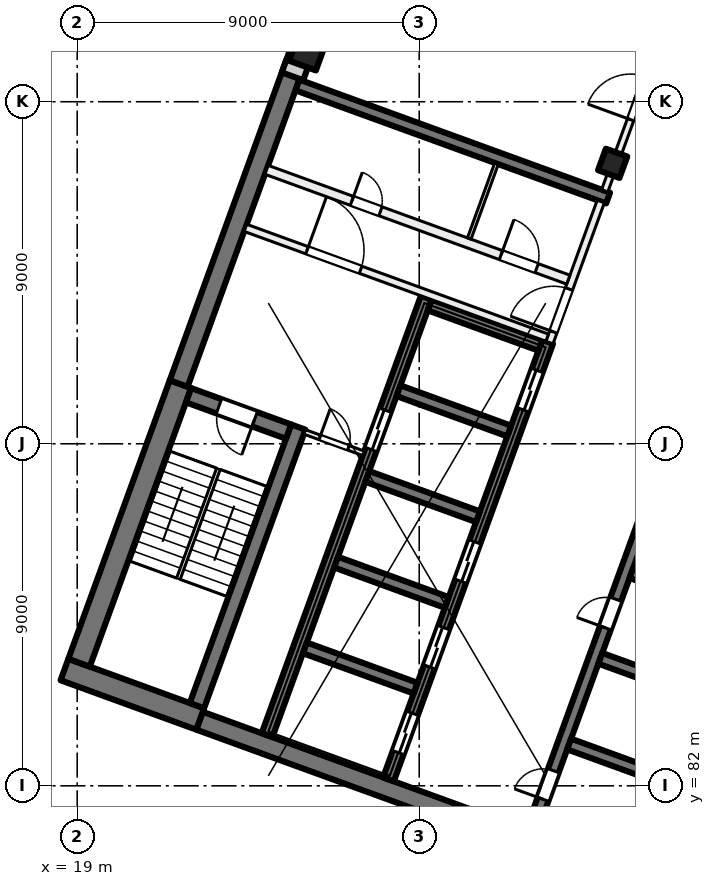
"""IFC4 building model, lengths in metres.
Left out: names, types, materials, properties, quantities, classifications, styles, units other than length and angle.
Written with IfcOpenShell. Run it as: python <this file> out.ifc"""

import sys

from ifc_helpers import new_model, si_unit, direction, frame, frame_2d, origin, origin_2d, place, context, subcontext, project, spatial, rectangle, extrude, element, fill, save


model = new_model("IFC4")
c1 = context("Model", 3, precision=1e-05, world=origin(), true_north=direction((0.0, 1.0)))
c2 = subcontext(c1, "Body", "Model", "MODEL_VIEW")
j1 = project(units=[si_unit("LENGTHUNIT", "METRE"), si_unit("PLANEANGLEUNIT", "RADIAN")], contexts=[c1])
p1 = place(None, origin())
s1 = spatial("IfcSite", under=j1, at=p1, CompositionType="ELEMENT")
p2 = place(p1, origin())
s2 = spatial("IfcBuilding", under=s1, at=p2, CompositionType="ELEMENT")
p3 = place(p2, frame((0.0, 0.0, 192.0)))
s3 = spatial("IfcBuildingStorey", under=s2, at=p3, CompositionType="ELEMENT", Elevation=192.0)
p4 = place(p3, frame((33.091, 98.379, 0.0), z_axis=(0.0, 0.0, 1.0), x_axis=(-0.342020143326, -0.939692620786, 0.0)))
e1 = element("IfcColumn", 1, at=p4, inside=s3, PredefinedType="COLUMN", context=c2, shape_type="SweptSolid", body=[
    extrude(rectangle(XDim=0.6, YDim=0.6, at=origin_2d()), origin(), (0.0, 0.0, 1.0), 4.0),
])
p5 = place(p3, frame((25.056, 101.303, 0.0), z_axis=(0.0, 0.0, 1.0), x_axis=(-0.342020143326, -0.939692620786, 0.0)))
e2 = element("IfcColumn", 2, at=p5, inside=s3, PredefinedType="COLUMN", context=c2, shape_type="SweptSolid", body=[
    extrude(rectangle(XDim=0.75, YDim=0.75, at=origin_2d()), origin(), (0.0, 0.0, 1.0), 4.0),
])
p6 = place(p3, frame((35.75, 78.788, 0.0), z_axis=(0.0, 0.0, 1.0), x_axis=(-0.939692894512, 0.342019391267, 0.0)))
e3 = element("IfcWall", 3, at=p6, inside=s3, PredefinedType="SHEAR", context=c2, shape_type="SweptSolid", body=[
    extrude(rectangle(XDim=14.4, YDim=0.5, at=frame_2d((7.2, 0.0))), origin(), (0.0, 0.0, 1.0), 4.0),
])
p7 = place(p3, frame((22.236, 83.76, 0.0), z_axis=(0.0, 0.0, 1.0), x_axis=(-0.939680822529, 0.342052557032, 0.0)))
e4 = element("IfcWall", 4, at=p7, inside=s3, PredefinedType="SHEAR", context=c2, shape_type="SweptSolid", body=[
    extrude(rectangle(XDim=3.8, YDim=0.6, at=frame_2d((1.9, 0.0))), origin(), (0.0, 0.0, 1.0), 4.0),
])
p8 = place(p3, frame((19.05, 85.239, 0.0), z_axis=(0.0, 0.0, 1.0), x_axis=(0.342016982193, 0.939693771338, 0.0)))
e5 = element("IfcWall", 5, at=p8, inside=s3, PredefinedType="SHEAR", context=c2, shape_type="SweptSolid", body=[
    extrude(rectangle(XDim=7.8, YDim=0.6, at=frame_2d((3.9, 0.0))), origin(), (0.0, 0.0, 1.0), 4.0),
])
p9 = place(p3, frame((21.67, 92.585, 0.0), z_axis=(0.0, 0.0, 1.0), x_axis=(0.342035714298, 0.93968695327, 0.0)))
e6 = element("IfcWall", 6, at=p9, inside=s3, PredefinedType="SHEAR", context=c2, shape_type="SweptSolid", body=[
    extrude(rectangle(XDim=8.975, YDim=0.5, at=frame_2d((4.488, 0.0))), origin(), (0.0, 0.0, 1.0), 4.0),
])
p10 = place(p3, frame((22.15, 84.11, 0.0), z_axis=(0.0, 0.0, 1.0), x_axis=(0.342016982193, 0.939693771338, 0.0)))
e7 = element("IfcWall", 7, at=p10, inside=s3, PredefinedType="SHEAR", context=c2, shape_type="SweptSolid", body=[
    extrude(rectangle(XDim=7.8, YDim=0.4, at=frame_2d((3.9, 0.0))), origin(), (0.0, 0.0, 1.0), 4.0),
])
p11 = place(p3, frame((24.562, 91.32, 0.0), z_axis=(0.0, 0.0, 1.0), x_axis=(-0.939717030584, 0.341953070509, 0.0)))
e8 = element("IfcWall", 8, at=p11, inside=s3, PredefinedType="SHEAR", context=c2, shape_type="SweptSolid", body=[
    extrude(rectangle(XDim=2.8, YDim=0.4, at=frame_2d((1.4, 0.0))), origin(), (0.0, 0.0, 1.0), 4.0),
])
p12 = place(p11, frame((0.95, 0.0, 0.0)))
e9 = element("IfcOpeningElement", 9, at=p12, cuts=e8, PredefinedType="OPENING", context=c2, shape_type="SweptSolid", body=[
    extrude(rectangle(XDim=1.0, YDim=2.1, at=frame_2d((0.5, 1.05))), frame((0.0, 0.21, 0.0), z_axis=(0.0, -1.0, 0.0), x_axis=(1.0, 0.0, 0.0)), (0.0, 0.0, 1.0), 0.42),
])
p13 = place(p3, frame((30.949, 80.801, 0.0), z_axis=(0.0, 0.0, 1.0), x_axis=(0.342016684409, 0.939693879721, 0.0)))
e10 = element("IfcWall", 10, at=p13, inside=s3, PredefinedType="SHEAR", context=c2, shape_type="SweptSolid", body=[
    extrude(rectangle(XDim=12.25, YDim=0.3, at=frame_2d((6.125, 0.0))), origin(), (0.0, 0.0, 1.0), 4.0),
])
p14 = place(p13, frame((0.9, 0.0, 0.0)))
e11 = element("IfcOpeningElement", 11, at=p14, cuts=e10, PredefinedType="OPENING", context=c2, shape_type="SweptSolid", body=[
    extrude(rectangle(XDim=0.8, YDim=2.1, at=frame_2d((0.4, 1.05))), frame((0.0, 0.16, 0.0), z_axis=(0.0, -1.0, 0.0), x_axis=(1.0, 0.0, 0.0)), (0.0, 0.0, 1.0), 0.32),
])
p15 = place(p13, frame((5.7, 0.0, 0.0)))
e12 = element("IfcOpeningElement", 12, at=p15, cuts=e10, PredefinedType="OPENING", context=c2, shape_type="SweptSolid", body=[
    extrude(rectangle(XDim=0.8, YDim=2.1, at=frame_2d((0.4, 1.05))), frame((0.0, 0.16, 0.0), z_axis=(0.0, -1.0, 0.0), x_axis=(1.0, 0.0, 0.0)), (0.0, 0.0, 1.0), 0.32),
])
p16 = place(p3, frame((34.858, 82.039, 0.0), z_axis=(0.0, 0.0, 1.0), x_axis=(-0.939689908313, 0.342027595692, 0.0)))
e13 = element("IfcWall", 13, at=p16, inside=s3, PredefinedType="SHEAR", context=c2, shape_type="SweptSolid", body=[
    extrude(rectangle(XDim=3.1, YDim=0.3, at=frame_2d((1.55, 0.0))), origin(), (0.0, 0.0, 1.0), 4.0),
])
p17 = place(p3, frame((35.679, 84.294, 0.0), z_axis=(0.0, 0.0, 1.0), x_axis=(-0.939706007505, 0.341983361377, 0.0)))
e14 = element("IfcWall", 14, at=p17, inside=s3, PredefinedType="SHEAR", context=c2, shape_type="SweptSolid", body=[
    extrude(rectangle(XDim=3.1, YDim=0.3, at=frame_2d((1.55, 0.0))), origin(), (0.0, 0.0, 1.0), 4.0),
])
p18 = place(p3, frame((36.5, 86.549, 0.0), z_axis=(0.0, 0.0, 1.0), x_axis=(-0.939689908313, 0.342027595692, 0.0)))
e15 = element("IfcWall", 15, at=p18, inside=s3, PredefinedType="SHEAR", context=c2, shape_type="SweptSolid", body=[
    extrude(rectangle(XDim=3.1, YDim=0.3, at=frame_2d((1.55, 0.0))), origin(), (0.0, 0.0, 1.0), 4.0),
])
p19 = place(p3, frame((27.191, 82.169, 0.0), z_axis=(0.0, 0.0, 1.0), x_axis=(0.342016684409, 0.939693879721, 0.0)))
e16 = element("IfcWall", 16, at=p19, inside=s3, PredefinedType="SHEAR", context=c2, shape_type="SweptSolid", body=[
    extrude(rectangle(XDim=12.25, YDim=0.3, at=frame_2d((6.125, 0.0))), origin(), (0.0, 0.0, 1.0), 4.0),
])
p20 = place(p19, frame((0.75, 0.0, 0.0)))
e17 = element("IfcOpeningElement", 17, at=p20, cuts=e16, PredefinedType="OPENING", context=c2, shape_type="SweptSolid", body=[
    extrude(rectangle(XDim=1.1, YDim=2.1, at=frame_2d((0.55, 1.05))), frame((0.0, 0.16, 0.0), z_axis=(0.0, -1.0, 0.0), x_axis=(1.0, 0.0, 0.0)), (0.0, 0.0, 1.0), 0.32),
])
p21 = place(p19, frame((3.15, 0.0, 0.0)))
e18 = element("IfcOpeningElement", 18, at=p21, cuts=e16, PredefinedType="OPENING", context=c2, shape_type="SweptSolid", body=[
    extrude(rectangle(XDim=1.1, YDim=2.1, at=frame_2d((0.55, 1.05))), frame((0.0, 0.16, 0.0), z_axis=(0.0, -1.0, 0.0), x_axis=(1.0, 0.0, 0.0)), (0.0, 0.0, 1.0), 0.32),
])
p22 = place(p19, frame((5.55, 0.0, 0.0)))
e19 = element("IfcOpeningElement", 19, at=p22, cuts=e16, PredefinedType="OPENING", context=c2, shape_type="SweptSolid", body=[
    extrude(rectangle(XDim=1.1, YDim=2.1, at=frame_2d((0.55, 1.05))), frame((0.0, 0.16, 0.0), z_axis=(0.0, -1.0, 0.0), x_axis=(1.0, 0.0, 0.0)), (0.0, 0.0, 1.0), 0.32),
])
p23 = place(p19, frame((10.35, 0.0, 0.0)))
e20 = element("IfcOpeningElement", 20, at=p23, cuts=e16, PredefinedType="OPENING", context=c2, shape_type="SweptSolid", body=[
    extrude(rectangle(XDim=1.1, YDim=2.1, at=frame_2d((0.55, 1.05))), frame((0.0, 0.16, 0.0), z_axis=(0.0, -1.0, 0.0), x_axis=(1.0, 0.0, 0.0)), (0.0, 0.0, 1.0), 0.32),
])
p24 = place(p3, frame((23.996, 83.332, 0.0), z_axis=(0.0, 0.0, 1.0), x_axis=(0.342016684409, 0.939693879721, 0.0)))
e21 = element("IfcWall", 21, at=p24, inside=s3, PredefinedType="SHEAR", context=c2, shape_type="SweptSolid", body=[
    extrude(rectangle(XDim=12.25, YDim=0.3, at=frame_2d((6.125, 0.0))), origin(), (0.0, 0.0, 1.0), 4.0),
])
p25 = place(p24, frame((8.0, 0.0, 0.0)))
e22 = element("IfcOpeningElement", 22, at=p25, cuts=e21, PredefinedType="OPENING", context=c2, shape_type="SweptSolid", body=[
    extrude(rectangle(XDim=1.1, YDim=2.1, at=frame_2d((0.55, 1.05))), frame((0.0, 0.16, 0.0), z_axis=(0.0, -1.0, 0.0), x_axis=(1.0, 0.0, 0.0)), (0.0, 0.0, 1.0), 0.32),
])
for number, where, z_axis, x_axis in (
    (23, (27.905, 84.57, 0.0), (0.0, 0.0, 1.0), (-0.94, 0.342, 0.0)),
    (24, (28.726, 86.825, 0.0), (0.0, 0.0, 1.0), (-0.94, 0.342, 0.0)),
    (25, (29.546, 89.08, 0.0), (0.0, 0.0, 1.0), (-0.94, 0.342, 0.0)),
):
    element("IfcWall", number, at=place(p3, frame(where, z_axis=z_axis, x_axis=x_axis)), inside=s3, PredefinedType="SHEAR", context=c2, shape_type="SweptSolid", body=[
        extrude(rectangle(XDim=3.1, YDim=0.3, at=frame_2d((1.55, 0.0))), origin(), (0.0, 0.0, 1.0), 4.0),
    ])
for number, where, z_axis, x_axis in (
    (26, (30.367, 91.336, 0.0), (0.0, 0.0, 1.0), (-0.94, 0.342, 0.0)),
    (27, (31.188, 93.591, 0.0), (0.0, 0.0, 1.0), (-0.94, 0.342, 0.0)),
):
    element("IfcWall", number, at=place(p3, frame(where, z_axis=z_axis, x_axis=x_axis)), inside=s3, PredefinedType="SHEAR", context=c2, shape_type="SweptSolid", body=[
        extrude(rectangle(XDim=3.1, YDim=0.3, at=frame_2d((1.55, 0.0))), origin(), (0.0, 0.0, 1.0), 4.0),
    ])
p26 = place(p3, frame((32.971, 97.465, 0.0), z_axis=(0.0, 0.0, 1.0), x_axis=(-0.939695066972, 0.34201342241, 0.0)))
e28 = element("IfcWall", 28, at=p26, inside=s3, PredefinedType="SHEAR", context=c2, shape_type="SweptSolid", body=[
    extrude(rectangle(XDim=8.7, YDim=0.3, at=frame_2d((4.35, 0.0))), origin(), (0.0, 0.0, 1.0), 4.0),
])
p27 = place(p3, frame((24.666, 100.669, 0.0), z_axis=(0.0, 0.0, 1.0), x_axis=(0.34201964167, 0.939692803373, 0.0)))
e29 = element("IfcWall", 29, at=p27, inside=s3, PredefinedType="SOLIDWALL", context=c2, shape_type="SweptSolid", body=[
    extrude(rectangle(XDim=32.884, YDim=0.6, at=frame_2d((16.442, 0.0))), origin(), (0.0, 0.0, 1.0), 3.625),
])
p28 = place(p27, frame((1.48, 0.0, 0.9)))
e30 = element("IfcOpeningElement", 30, at=p28, cuts=e29, PredefinedType="OPENING", context=c2, shape_type="SweptSolid", body=[
    extrude(rectangle(XDim=3.0, YDim=2.4, at=frame_2d((1.5, 1.2))), frame((0.0, 0.31, 0.0), z_axis=(0.0, -1.0, 0.0), x_axis=(1.0, 0.0, 0.0)), (0.0, 0.0, 1.0), 0.62),
])
p29 = place(p27, frame((5.98, 0.0, 0.9)))
e31 = element("IfcOpeningElement", 31, at=p29, cuts=e29, PredefinedType="OPENING", context=c2, shape_type="SweptSolid", body=[
    extrude(rectangle(XDim=3.0, YDim=2.4, at=frame_2d((1.5, 1.2))), frame((0.0, 0.31, 0.0), z_axis=(0.0, -1.0, 0.0), x_axis=(1.0, 0.0, 0.0)), (0.0, 0.0, 1.0), 0.62),
])
p30 = place(p27, frame((10.48, 0.0, 0.9)))
e32 = element("IfcOpeningElement", 32, at=p30, cuts=e29, PredefinedType="OPENING", context=c2, shape_type="SweptSolid", body=[
    extrude(rectangle(XDim=3.0, YDim=2.4, at=frame_2d((1.5, 1.2))), frame((0.0, 0.31, 0.0), z_axis=(0.0, -1.0, 0.0), x_axis=(1.0, 0.0, 0.0)), (0.0, 0.0, 1.0), 0.62),
])
p31 = place(p27, frame((14.98, 0.0, 0.9)))
e33 = element("IfcOpeningElement", 33, at=p31, cuts=e29, PredefinedType="OPENING", context=c2, shape_type="SweptSolid", body=[
    extrude(rectangle(XDim=3.0, YDim=2.4, at=frame_2d((1.5, 1.2))), frame((0.0, 0.31, 0.0), z_axis=(0.0, -1.0, 0.0), x_axis=(1.0, 0.0, 0.0)), (0.0, 0.0, 1.0), 0.62),
])
p32 = place(p27, frame((20.08, 0.0, 0.0)))
e34 = element("IfcOpeningElement", 34, at=p32, cuts=e29, PredefinedType="OPENING", context=c2, shape_type="SweptSolid", body=[
    extrude(rectangle(XDim=1.8, YDim=2.4, at=frame_2d((0.9, 1.2))), frame((0.0, 0.31, 0.0), z_axis=(0.0, -1.0, 0.0), x_axis=(1.0, 0.0, 0.0)), (0.0, 0.0, 1.0), 0.62),
])
p33 = place(p27, frame((23.98, 0.0, 0.9)))
e35 = element("IfcOpeningElement", 35, at=p33, cuts=e29, PredefinedType="OPENING", context=c2, shape_type="SweptSolid", body=[
    extrude(rectangle(XDim=3.0, YDim=2.4, at=frame_2d((1.5, 1.2))), frame((0.0, 0.31, 0.0), z_axis=(0.0, -1.0, 0.0), x_axis=(1.0, 0.0, 0.0)), (0.0, 0.0, 1.0), 0.62),
])
p34 = place(p27, frame((28.48, 0.0, 0.9)))
e36 = element("IfcOpeningElement", 36, at=p34, cuts=e29, PredefinedType="OPENING", context=c2, shape_type="SweptSolid", body=[
    extrude(rectangle(XDim=3.0, YDim=2.4, at=frame_2d((1.5, 1.2))), frame((0.0, 0.31, 0.0), z_axis=(0.0, -1.0, 0.0), x_axis=(1.0, 0.0, 0.0)), (0.0, 0.0, 1.0), 0.62),
])
p35 = place(p3, frame((31.427, 93.663, 0.0), z_axis=(0.0, 0.0, 1.0), x_axis=(0.342030870568, 0.93968871632, 0.0)))
e37 = element("IfcWall", 37, at=p35, inside=s3, PredefinedType="PARTITIONING", context=c2, shape_type="SweptSolid", body=[
    extrude(rectangle(XDim=3.95, YDim=0.2, at=frame_2d((1.975, 0.0))), origin(), (0.0, 0.0, 1.0), 3.625),
])
p36 = place(p35, frame((0.3, 0.0, 0.0)))
e38 = element("IfcOpeningElement", 38, at=p36, cuts=e37, PredefinedType="OPENING", context=c2, shape_type="SweptSolid", body=[
    extrude(rectangle(XDim=1.2, YDim=2.1, at=frame_2d((0.6, 1.05))), frame((0.0, 0.11, 0.0), z_axis=(0.0, -1.0, 0.0), x_axis=(1.0, 0.0, 0.0)), (0.0, 0.0, 1.0), 0.22),
])
p37 = place(p3, frame((23.427, 96.682, 0.0), z_axis=(0.0, 0.0, 1.0), x_axis=(0.939690465531, -0.342026064782, 0.0)))
e39 = element("IfcWall", 39, at=p37, inside=s3, PredefinedType="PARTITIONING", context=c2, shape_type="SweptSolid", body=[
    extrude(rectangle(XDim=8.45, YDim=0.2, at=frame_2d((4.225, 0.0))), origin(), (0.0, 0.0, 1.0), 3.625),
])
p38 = place(p37, frame((1.725, 0.0, 0.0)))
e40 = element("IfcOpeningElement", 40, at=p38, cuts=e39, PredefinedType="OPENING", context=c2, shape_type="SweptSolid", body=[
    extrude(rectangle(XDim=1.5, YDim=2.1, at=frame_2d((0.75, 1.05))), frame((0.0, 0.11, 0.0), z_axis=(0.0, -1.0, 0.0), x_axis=(1.0, 0.0, 0.0)), (0.0, 0.0, 1.0), 0.22),
])
p39 = place(p3, frame((23.983, 98.208, 0.0), z_axis=(0.0, 0.0, 1.0), x_axis=(0.939699751196, -0.342000552051, 0.0)))
e41 = element("IfcWall", 41, at=p39, inside=s3, PredefinedType="PARTITIONING", context=c2, shape_type="SweptSolid", body=[
    extrude(rectangle(XDim=8.45, YDim=0.25, at=frame_2d((4.225, 0.0))), origin(), (0.0, 0.0, 1.0), 3.625),
])
p40 = place(p39, frame((6.565, 0.0, 0.0)))
e42 = element("IfcOpeningElement", 42, at=p40, cuts=e41, PredefinedType="OPENING", context=c2, shape_type="SweptSolid", body=[
    extrude(rectangle(XDim=1.0, YDim=2.1, at=frame_2d((0.5, 1.05))), frame((0.0, 0.135, 0.0), z_axis=(0.0, -1.0, 0.0), x_axis=(1.0, 0.0, 0.0)), (0.0, 0.0, 1.0), 0.27),
])
p41 = place(p39, frame((2.39, 0.0, 0.0)))
e43 = element("IfcOpeningElement", 43, at=p41, cuts=e41, PredefinedType="OPENING", context=c2, shape_type="SweptSolid", body=[
    extrude(rectangle(XDim=0.8, YDim=2.1, at=frame_2d((0.4, 1.05))), frame((0.0, 0.135, 0.0), z_axis=(0.0, -1.0, 0.0), x_axis=(1.0, 0.0, 0.0)), (0.0, 0.0, 1.0), 0.27),
])
p42 = place(p3, frame((24.985, 91.312, 0.0), z_axis=(0.0, 0.0, 1.0), x_axis=(0.939719959755, -0.341945020783, 0.0)))
e44 = element("IfcWall", 44, at=p42, inside=s3, PredefinedType="PARTITIONING", context=c2, shape_type="SweptSolid", body=[
    extrude(rectangle(XDim=1.65, YDim=0.125, at=frame_2d((0.825, 0.0))), origin(), (0.0, 0.0, 1.0), 3.625),
])
p43 = place(p42, frame((0.425, 0.0, 0.0)))
e45 = element("IfcOpeningElement", 45, at=p43, cuts=e44, PredefinedType="OPENING", context=c2, shape_type="SweptSolid", body=[
    extrude(rectangle(XDim=0.8, YDim=2.1, at=frame_2d((0.4, 1.05))), frame((0.0, 0.073, 0.0), z_axis=(0.0, -1.0, 0.0), x_axis=(1.0, 0.0, 0.0)), (0.0, 0.0, 1.0), 0.145),
])
p44 = place(p3, frame((29.316, 96.4, 0.0), z_axis=(0.0, 0.0, 1.0), x_axis=(0.342023078919, 0.939691552312, 0.0)))
e46 = element("IfcWall", 46, at=p44, inside=s3, PredefinedType="PARTITIONING", context=c2, shape_type="SweptSolid", body=[
    extrude(rectangle(XDim=2.1, YDim=0.1, at=frame_2d((1.05, 0.0))), origin(), (0.0, 0.0, 1.0), 3.625),
])
p45 = place(p3, frame((32.881, 97.657, 0.0), z_axis=(0.0, 0.0, 1.0), x_axis=(0.342058204353, 0.939678766832, 0.0)))
e47 = element("IfcWall", 47, at=p45, inside=s3, PredefinedType="PARTITIONING", context=c2, shape_type="SweptSolid", body=[
    extrude(rectangle(XDim=5.163, YDim=0.175, at=frame_2d((2.581, 0.0))), origin(), (0.0, 0.0, 1.0), 3.625),
])
p46 = place(p45, frame((1.991, 0.0, 0.0)))
e48 = element("IfcOpeningElement", 48, at=p46, cuts=e47, PredefinedType="OPENING", context=c2, shape_type="SweptSolid", body=[
    extrude(rectangle(XDim=1.2, YDim=2.1, at=frame_2d((0.6, 1.05))), frame((0.0, 0.097, 0.0), z_axis=(0.0, -1.0, 0.0), x_axis=(1.0, 0.0, 0.0)), (0.0, 0.0, 1.0), 0.195),
])
p47 = place(p20, origin())
e49 = element("IfcDoor", 49, at=p47, inside=s3, OperationType="DOUBLE_DOOR_SLIDING", PredefinedType="DOOR", context=c2, shape_type="SweptSolid", body=[
    extrude(rectangle(XDim=1.1, YDim=2.1, at=frame_2d((0.55, 1.05))), frame((0.0, 0.025, 0.0), z_axis=(0.0, -1.0, 0.0), x_axis=(1.0, 0.0, 0.0)), (0.0, 0.0, 1.0), 0.05),
])
fill(e17, e49)
p48 = place(p21, origin())
e50 = element("IfcDoor", 50, at=p48, inside=s3, OperationType="DOUBLE_DOOR_SLIDING", PredefinedType="DOOR", context=c2, shape_type="SweptSolid", body=[
    extrude(rectangle(XDim=1.1, YDim=2.1, at=frame_2d((0.55, 1.05))), frame((0.0, 0.025, 0.0), z_axis=(0.0, -1.0, 0.0), x_axis=(1.0, 0.0, 0.0)), (0.0, 0.0, 1.0), 0.05),
])
fill(e18, e50)
p49 = place(p22, origin())
e51 = element("IfcDoor", 51, at=p49, inside=s3, OperationType="DOUBLE_DOOR_SLIDING", PredefinedType="DOOR", context=c2, shape_type="SweptSolid", body=[
    extrude(rectangle(XDim=1.1, YDim=2.1, at=frame_2d((0.55, 1.05))), frame((0.0, 0.025, 0.0), z_axis=(0.0, -1.0, 0.0), x_axis=(1.0, 0.0, 0.0)), (0.0, 0.0, 1.0), 0.05),
])
fill(e19, e51)
p50 = place(p23, origin())
e52 = element("IfcDoor", 52, at=p50, inside=s3, OperationType="DOUBLE_DOOR_SLIDING", PredefinedType="DOOR", context=c2, shape_type="SweptSolid", body=[
    extrude(rectangle(XDim=1.1, YDim=2.1, at=frame_2d((0.55, 1.05))), frame((0.0, 0.025, 0.0), z_axis=(0.0, -1.0, 0.0), x_axis=(1.0, 0.0, 0.0)), (0.0, 0.0, 1.0), 0.05),
])
fill(e20, e52)
p51 = place(p14, origin())
e53 = element("IfcDoor", 53, at=p51, inside=s3, OperationType="SINGLE_SWING_LEFT", PredefinedType="DOOR", context=c2, shape_type="SweptSolid", body=[
    extrude(rectangle(XDim=0.8, YDim=2.1, at=frame_2d((0.4, 1.05))), frame((0.0, 0.025, 0.0), z_axis=(0.0, -1.0, 0.0), x_axis=(1.0, 0.0, 0.0)), (0.0, 0.0, 1.0), 0.05),
])
fill(e11, e53)
p52 = place(p15, origin())
e54 = element("IfcDoor", 54, at=p52, inside=s3, OperationType="SINGLE_SWING_RIGHT", PredefinedType="DOOR", context=c2, shape_type="SweptSolid", body=[
    extrude(rectangle(XDim=0.8, YDim=2.1, at=frame_2d((0.4, 1.05))), frame((0.0, 0.025, 0.0), z_axis=(0.0, -1.0, 0.0), x_axis=(1.0, 0.0, 0.0)), (0.0, 0.0, 1.0), 0.05),
])
fill(e12, e54)
p53 = place(p36, origin())
e55 = element("IfcDoor", 55, at=p53, inside=s3, OperationType="DOUBLE_DOOR_SINGLE_SWING", PredefinedType="DOOR", context=c2, shape_type="SweptSolid", body=[
    extrude(rectangle(XDim=1.2, YDim=2.1, at=frame_2d((0.6, 1.05))), frame((0.0, 0.025, 0.0), z_axis=(0.0, -1.0, 0.0), x_axis=(1.0, 0.0, 0.0)), (0.0, 0.0, 1.0), 0.05),
])
fill(e38, e55)
p54 = place(p38, origin())
e56 = element("IfcDoor", 56, at=p54, inside=s3, OperationType="DOUBLE_DOOR_SINGLE_SWING", PredefinedType="DOOR", context=c2, shape_type="SweptSolid", body=[
    extrude(rectangle(XDim=1.5, YDim=2.1, at=frame_2d((0.75, 1.05))), frame((0.0, 0.025, 0.0), z_axis=(0.0, -1.0, 0.0), x_axis=(1.0, 0.0, 0.0)), (0.0, 0.0, 1.0), 0.05),
])
fill(e40, e56)
p55 = place(p12, origin())
e57 = element("IfcDoor", 57, at=p55, inside=s3, OperationType="SINGLE_SWING_LEFT", PredefinedType="DOOR", context=c2, shape_type="SweptSolid", body=[
    extrude(rectangle(XDim=1.0, YDim=2.1, at=frame_2d((0.5, 1.05))), frame((0.0, 0.025, 0.0), z_axis=(0.0, -1.0, 0.0), x_axis=(1.0, 0.0, 0.0)), (0.0, 0.0, 1.0), 0.05),
])
fill(e9, e57)
p56 = place(p43, origin())
e58 = element("IfcDoor", 58, at=p56, inside=s3, OperationType="SINGLE_SWING_RIGHT", PredefinedType="DOOR", context=c2, shape_type="SweptSolid", body=[
    extrude(rectangle(XDim=0.8, YDim=2.1, at=frame_2d((0.4, 1.05))), frame((0.0, 0.025, 0.0), z_axis=(0.0, -1.0, 0.0), x_axis=(1.0, 0.0, 0.0)), (0.0, 0.0, 1.0), 0.05),
])
fill(e45, e58)
p57 = place(p40, origin())
e59 = element("IfcDoor", 59, at=p57, inside=s3, OperationType="SINGLE_SWING_LEFT", PredefinedType="DOOR", context=c2, shape_type="SweptSolid", body=[
    extrude(rectangle(XDim=1.0, YDim=2.1, at=frame_2d((0.5, 1.05))), frame((0.0, 0.025, 0.0), z_axis=(0.0, -1.0, 0.0), x_axis=(1.0, 0.0, 0.0)), (0.0, 0.0, 1.0), 0.05),
])
fill(e42, e59)
p58 = place(p41, origin())
e60 = element("IfcDoor", 60, at=p58, inside=s3, OperationType="SINGLE_SWING_RIGHT", PredefinedType="DOOR", context=c2, shape_type="SweptSolid", body=[
    extrude(rectangle(XDim=0.8, YDim=2.1, at=frame_2d((0.4, 1.05))), frame((0.0, 0.025, 0.0), z_axis=(0.0, -1.0, 0.0), x_axis=(1.0, 0.0, 0.0)), (0.0, 0.0, 1.0), 0.05),
])
fill(e43, e60)
p59 = place(p25, origin())
e61 = element("IfcDoor", 61, at=p59, inside=s3, OperationType="DOUBLE_DOOR_SLIDING", PredefinedType="DOOR", context=c2, shape_type="SweptSolid", body=[
    extrude(rectangle(XDim=1.1, YDim=2.1, at=frame_2d((0.55, 1.05))), frame((0.0, 0.025, 0.0), z_axis=(0.0, -1.0, 0.0), x_axis=(1.0, 0.0, 0.0)), (0.0, 0.0, 1.0), 0.05),
])
fill(e22, e61)
p60 = place(p46, origin())
e62 = element("IfcDoor", 62, at=p60, inside=s3, OperationType="DOUBLE_DOOR_SINGLE_SWING", PredefinedType="DOOR", context=c2, shape_type="SweptSolid", body=[
    extrude(rectangle(XDim=1.2, YDim=2.1, at=frame_2d((0.6, 1.05))), frame((0.0, 0.025, 0.0), z_axis=(0.0, -1.0, 0.0), x_axis=(1.0, 0.0, 0.0)), (0.0, 0.0, 1.0), 0.05),
])
fill(e48, e62)
save(model, sys.argv[1])
